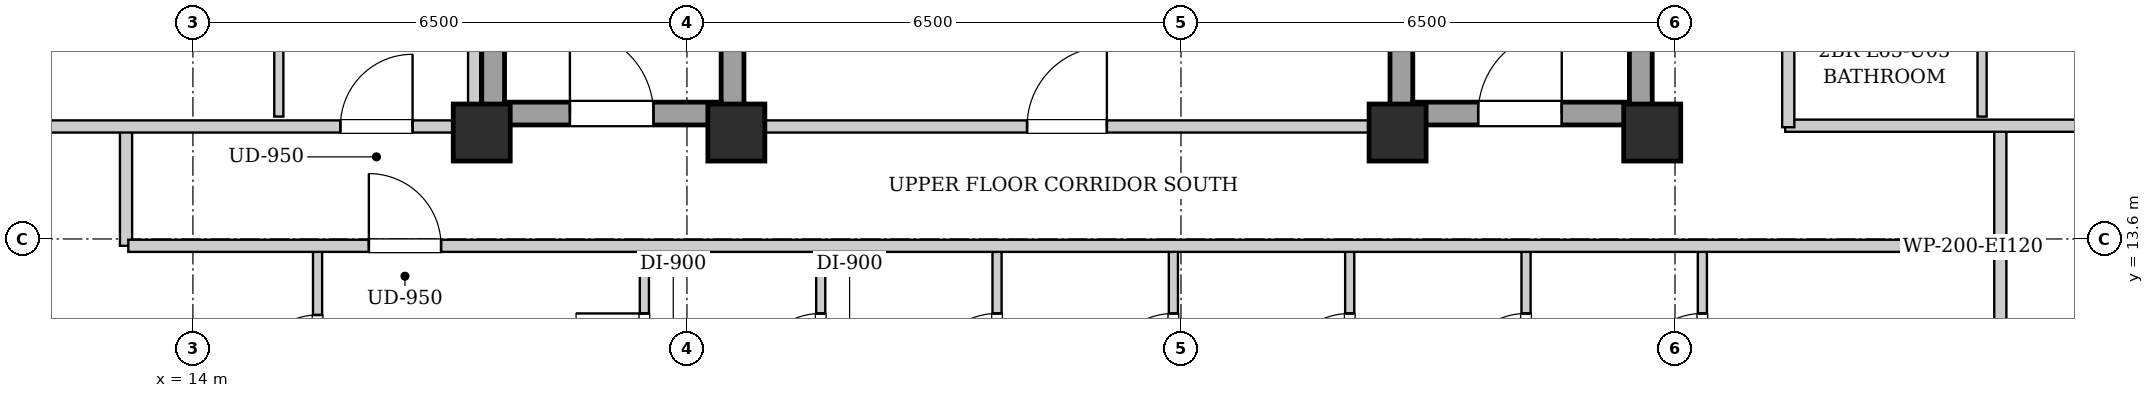
"""IFC4 building model, lengths in metres.
Left out: names, types, materials, properties, quantities, classifications, styles, units other than length and angle.
Written with IfcOpenShell. Run it as: python <this file> out.ifc"""

import sys

from ifc_helpers import new_model, si_unit, direction, frame, frame_2d, origin, origin_2d, place, context, subcontext, project, spatial, rectangle, extrude, element, fill, save


model = new_model("IFC4")
c1 = context("Model", 3, precision=1e-05, world=origin(), true_north=direction((0.0, 1.0)))
c2 = subcontext(c1, "Body", "Model", "MODEL_VIEW")
j1 = project(units=[si_unit("LENGTHUNIT", "METRE"), si_unit("PLANEANGLEUNIT", "RADIAN")], contexts=[c1])
p1 = place(None, origin())
s1 = spatial("IfcSite", under=j1, at=p1, CompositionType="ELEMENT")
p2 = place(p1, origin())
s2 = spatial("IfcBuilding", under=s1, at=p2, CompositionType="ELEMENT")
p3 = place(p2, frame((0.0, 0.0, 224.1)))
s3 = spatial("IfcBuildingStorey", under=s2, at=p3, CompositionType="ELEMENT", Elevation=224.1)
for number, where, z_axis, x_axis in (
    (1, (17.8, 15.0, 0.0), (0.0, 0.0, 1.0), (1.0, 0.0, 0.0)),
    (2, (21.15, 15.0, 0.0), (0.0, 0.0, 1.0), (1.0, 0.0, 0.0)),
    (3, (29.85, 15.0, 0.0), (0.0, 0.0, 1.0), (1.0, 0.0, 0.0)),
    (4, (33.2, 15.0, 0.0), (0.0, 0.0, 1.0), (1.0, 0.0, 0.0)),
):
    element("IfcColumn", number, at=place(p3, frame(where, z_axis=z_axis, x_axis=x_axis)), inside=s3, PredefinedType="COLUMN", context=c2, shape_type="SweptSolid", body=[
        extrude(rectangle(XDim=0.75, YDim=0.75, at=origin_2d()), origin(), (0.0, 0.0, 1.0), 3.4),
    ])
for number, where, z_axis, x_axis in (
    (5, (17.95, 15.1, 0.0), (0.0, 0.0, 1.0), (0.0, 1.0, 0.0)),
    (6, (21.1, 15.1, 0.0), (0.0, 0.0, 1.0), (0.0, 1.0, 0.0)),
):
    element("IfcWall", number, at=place(p3, frame(where, z_axis=z_axis, x_axis=x_axis)), inside=s3, PredefinedType="SHEAR", context=c2, shape_type="SweptSolid", body=[
        extrude(rectangle(XDim=9.0, YDim=0.3, at=frame_2d((4.5, 0.0))), origin(), (0.0, 0.0, 1.0), 3.14),
    ])
p4 = place(p3, frame((18.1, 15.25, 0.0), z_axis=(0.0, 0.0, 1.0), x_axis=(1.0, 0.0, 0.0)))
e7 = element("IfcWall", 7, at=p4, inside=s3, PredefinedType="SHEAR", context=c2, shape_type="SweptSolid", body=[
    extrude(rectangle(XDim=2.85, YDim=0.3, at=frame_2d((1.425, 0.0))), origin(), (0.0, 0.0, 1.0), 3.14),
])
p5 = place(p4, frame((0.86, 0.0, 0.0)))
e8 = element("IfcOpeningElement", 8, at=p5, cuts=e7, PredefinedType="OPENING", context=c2, shape_type="SweptSolid", body=[
    extrude(rectangle(XDim=1.1, YDim=2.05, at=frame_2d((0.55, 1.025))), frame((0.0, 0.16, 0.0), z_axis=(0.0, -1.0, 0.0), x_axis=(1.0, 0.0, 0.0)), (0.0, 0.0, 1.0), 0.32),
])
for number, where, z_axis, x_axis in (
    (9, (29.9, 15.1, 0.0), (0.0, 0.0, 1.0), (0.0, 1.0, 0.0)),
    (10, (33.05, 15.1, 0.0), (0.0, 0.0, 1.0), (0.0, 1.0, 0.0)),
):
    element("IfcWall", number, at=place(p3, frame(where, z_axis=z_axis, x_axis=x_axis)), inside=s3, PredefinedType="SHEAR", context=c2, shape_type="SweptSolid", body=[
        extrude(rectangle(XDim=9.0, YDim=0.3, at=frame_2d((4.5, 0.0))), origin(), (0.0, 0.0, 1.0), 3.14),
    ])
p6 = place(p3, frame((30.05, 15.25, 0.0), z_axis=(0.0, 0.0, 1.0), x_axis=(1.0, 0.0, 0.0)))
e11 = element("IfcWall", 11, at=p6, inside=s3, PredefinedType="SHEAR", context=c2, shape_type="SweptSolid", body=[
    extrude(rectangle(XDim=2.85, YDim=0.3, at=frame_2d((1.425, 0.0))), origin(), (0.0, 0.0, 1.0), 3.14),
])
p7 = place(p6, frame((0.86, 0.0, 0.0)))
e12 = element("IfcOpeningElement", 12, at=p7, cuts=e11, PredefinedType="OPENING", context=c2, shape_type="SweptSolid", body=[
    extrude(rectangle(XDim=1.1, YDim=2.05, at=frame_2d((0.55, 1.025))), frame((0.0, 0.16, 0.0), z_axis=(0.0, -1.0, 0.0), x_axis=(1.0, 0.0, 0.0)), (0.0, 0.0, 1.0), 0.32),
])
p8 = place(p3, frame((21.25, 15.08, 0.0), z_axis=(0.0, 0.0, 1.0), x_axis=(1.0, 0.0, 0.0)))
e13 = element("IfcWall", 13, at=p8, inside=s3, PredefinedType="PARTITIONING", context=c2, shape_type="SweptSolid", body=[
    extrude(rectangle(XDim=8.5, YDim=0.16, at=frame_2d((4.25, 0.0))), origin(), (0.0, 0.0, 1.0), 2.668),
])
p9 = place(p8, frame((3.725, 0.0, 0.0)))
e14 = element("IfcOpeningElement", 14, at=p9, cuts=e13, PredefinedType="OPENING", context=c2, shape_type="SweptSolid", body=[
    extrude(rectangle(XDim=1.05, YDim=2.05, at=frame_2d((0.525, 1.025))), frame((0.0, 0.09, 0.0), z_axis=(0.0, -1.0, 0.0), x_axis=(1.0, 0.0, 0.0)), (0.0, 0.0, 1.0), 0.18),
])
for number, where, z_axis, x_axis in (
    (15, (13.12, 13.51, 0.0), (0.0, 0.0, 1.0), (0.0, 1.0, 0.0)),
    (16, (37.78, 13.51, 0.0), (0.0, 0.0, 1.0), (0.0, 1.0, 0.0)),
):
    element("IfcWall", number, at=place(p3, frame(where, z_axis=z_axis, x_axis=x_axis)), inside=s3, PredefinedType="PARTITIONING", context=c2, shape_type="SweptSolid", body=[
        extrude(rectangle(XDim=1.58, YDim=0.16, at=frame_2d((0.79, 0.0))), origin(), (0.0, 0.0, 1.0), 3.14),
    ])
p10 = place(p3, frame((34.95, 15.09, 0.0), z_axis=(0.0, 0.0, 1.0), x_axis=(1.0, 0.0, 0.0)))
e17 = element("IfcWall", 17, at=p10, inside=s3, PredefinedType="PARTITIONING", context=c2, shape_type="SweptSolid", body=[
    extrude(rectangle(XDim=5.07, YDim=0.16, at=frame_2d((2.535, 0.0))), origin(), (0.0, 0.0, 1.0), 2.668),
])
p11 = place(p3, frame((37.78, 10.81, 0.0), z_axis=(0.0, 0.0, 1.0), x_axis=(0.0, 1.0, 0.0)))
e18 = element("IfcWall", 18, at=p11, inside=s3, PredefinedType="PARTITIONING", context=c2, shape_type="SweptSolid", body=[
    extrude(rectangle(XDim=2.66, YDim=0.16, at=frame_2d((1.33, 0.0))), origin(), (0.0, 0.0, 1.0), 3.14),
])
p12 = place(p3, frame((15.64, 10.87, 0.0), z_axis=(0.0, 0.0, 1.0), x_axis=(0.0, 1.0, 0.0)))
e19 = element("IfcWall", 19, at=p12, inside=s3, PredefinedType="PARTITIONING", context=c2, shape_type="SweptSolid", body=[
    extrude(rectangle(XDim=2.6, YDim=0.12, at=frame_2d((1.3, 0.0))), origin(), (0.0, 0.0, 1.0), 3.14),
])
p13 = place(p12, frame((0.87, 0.0, 0.0)))
e20 = element("IfcOpeningElement", 20, at=p13, cuts=e19, PredefinedType="OPENING", context=c2, shape_type="SweptSolid", body=[
    extrude(rectangle(XDim=0.86, YDim=2.05, at=frame_2d((0.43, 1.025))), frame((0.0, 0.07, 0.0), z_axis=(0.0, -1.0, 0.0), x_axis=(1.0, 0.0, 0.0)), (0.0, 0.0, 1.0), 0.14),
])
p14 = place(p3, frame((19.94, 10.87, 0.0), z_axis=(0.0, 0.0, 1.0), x_axis=(0.0, 1.0, 0.0)))
e21 = element("IfcWall", 21, at=p14, inside=s3, PredefinedType="PARTITIONING", context=c2, shape_type="SweptSolid", body=[
    extrude(rectangle(XDim=2.6, YDim=0.12, at=frame_2d((1.3, 0.0))), origin(), (0.0, 0.0, 1.0), 3.14),
])
p15 = place(p14, frame((0.85, 0.0, 0.0)))
e22 = element("IfcOpeningElement", 22, at=p15, cuts=e21, PredefinedType="OPENING", context=c2, shape_type="SweptSolid", body=[
    extrude(rectangle(XDim=0.9, YDim=2.05, at=frame_2d((0.45, 1.025))), frame((0.0, 0.07, 0.0), z_axis=(0.0, -1.0, 0.0), x_axis=(1.0, 0.0, 0.0)), (0.0, 0.0, 1.0), 0.14),
])
p16 = place(p3, frame((22.26, 10.87, 0.0), z_axis=(0.0, 0.0, 1.0), x_axis=(0.0, 1.0, 0.0)))
e23 = element("IfcWall", 23, at=p16, inside=s3, PredefinedType="PARTITIONING", context=c2, shape_type="SweptSolid", body=[
    extrude(rectangle(XDim=2.6, YDim=0.12, at=frame_2d((1.3, 0.0))), origin(), (0.0, 0.0, 1.0), 3.14),
])
p17 = place(p16, frame((0.85, 0.0, 0.0)))
e24 = element("IfcOpeningElement", 24, at=p17, cuts=e23, PredefinedType="OPENING", context=c2, shape_type="SweptSolid", body=[
    extrude(rectangle(XDim=0.9, YDim=2.05, at=frame_2d((0.45, 1.025))), frame((0.0, 0.07, 0.0), z_axis=(0.0, -1.0, 0.0), x_axis=(1.0, 0.0, 0.0)), (0.0, 0.0, 1.0), 0.14),
])
p18 = place(p3, frame((24.58, 10.87, 0.0), z_axis=(0.0, 0.0, 1.0), x_axis=(0.0, 1.0, 0.0)))
e25 = element("IfcWall", 25, at=p18, inside=s3, PredefinedType="PARTITIONING", context=c2, shape_type="SweptSolid", body=[
    extrude(rectangle(XDim=2.6, YDim=0.12, at=frame_2d((1.3, 0.0))), origin(), (0.0, 0.0, 1.0), 3.14),
])
p19 = place(p18, frame((0.85, 0.0, 0.0)))
e26 = element("IfcOpeningElement", 26, at=p19, cuts=e25, PredefinedType="OPENING", context=c2, shape_type="SweptSolid", body=[
    extrude(rectangle(XDim=0.9, YDim=2.05, at=frame_2d((0.45, 1.025))), frame((0.0, 0.07, 0.0), z_axis=(0.0, -1.0, 0.0), x_axis=(1.0, 0.0, 0.0)), (0.0, 0.0, 1.0), 0.14),
])
p20 = place(p3, frame((26.9, 10.87, 0.0), z_axis=(0.0, 0.0, 1.0), x_axis=(0.0, 1.0, 0.0)))
e27 = element("IfcWall", 27, at=p20, inside=s3, PredefinedType="PARTITIONING", context=c2, shape_type="SweptSolid", body=[
    extrude(rectangle(XDim=2.6, YDim=0.12, at=frame_2d((1.3, 0.0))), origin(), (0.0, 0.0, 1.0), 3.14),
])
p21 = place(p20, frame((0.85, 0.0, 0.0)))
e28 = element("IfcOpeningElement", 28, at=p21, cuts=e27, PredefinedType="OPENING", context=c2, shape_type="SweptSolid", body=[
    extrude(rectangle(XDim=0.9, YDim=2.05, at=frame_2d((0.45, 1.025))), frame((0.0, 0.07, 0.0), z_axis=(0.0, -1.0, 0.0), x_axis=(1.0, 0.0, 0.0)), (0.0, 0.0, 1.0), 0.14),
])
p22 = place(p3, frame((29.22, 10.87, 0.0), z_axis=(0.0, 0.0, 1.0), x_axis=(0.0, 1.0, 0.0)))
e29 = element("IfcWall", 29, at=p22, inside=s3, PredefinedType="PARTITIONING", context=c2, shape_type="SweptSolid", body=[
    extrude(rectangle(XDim=2.6, YDim=0.12, at=frame_2d((1.3, 0.0))), origin(), (0.0, 0.0, 1.0), 3.14),
])
p23 = place(p22, frame((0.85, 0.0, 0.0)))
e30 = element("IfcOpeningElement", 30, at=p23, cuts=e29, PredefinedType="OPENING", context=c2, shape_type="SweptSolid", body=[
    extrude(rectangle(XDim=0.9, YDim=2.05, at=frame_2d((0.45, 1.025))), frame((0.0, 0.07, 0.0), z_axis=(0.0, -1.0, 0.0), x_axis=(1.0, 0.0, 0.0)), (0.0, 0.0, 1.0), 0.14),
])
p24 = place(p3, frame((31.54, 10.87, 0.0), z_axis=(0.0, 0.0, 1.0), x_axis=(0.0, 1.0, 0.0)))
e31 = element("IfcWall", 31, at=p24, inside=s3, PredefinedType="PARTITIONING", context=c2, shape_type="SweptSolid", body=[
    extrude(rectangle(XDim=2.6, YDim=0.12, at=frame_2d((1.3, 0.0))), origin(), (0.0, 0.0, 1.0), 3.14),
])
p25 = place(p24, frame((0.85, 0.0, 0.0)))
e32 = element("IfcOpeningElement", 32, at=p25, cuts=e31, PredefinedType="OPENING", context=c2, shape_type="SweptSolid", body=[
    extrude(rectangle(XDim=0.9, YDim=2.05, at=frame_2d((0.45, 1.025))), frame((0.0, 0.07, 0.0), z_axis=(0.0, -1.0, 0.0), x_axis=(1.0, 0.0, 0.0)), (0.0, 0.0, 1.0), 0.14),
])
p26 = place(p3, frame((33.86, 10.87, 0.0), z_axis=(0.0, 0.0, 1.0), x_axis=(0.0, 1.0, 0.0)))
e33 = element("IfcWall", 33, at=p26, inside=s3, PredefinedType="PARTITIONING", context=c2, shape_type="SweptSolid", body=[
    extrude(rectangle(XDim=2.6, YDim=0.12, at=frame_2d((1.3, 0.0))), origin(), (0.0, 0.0, 1.0), 3.14),
])
p27 = place(p26, frame((0.85, 0.0, 0.0)))
e34 = element("IfcOpeningElement", 34, at=p27, cuts=e33, PredefinedType="OPENING", context=c2, shape_type="SweptSolid", body=[
    extrude(rectangle(XDim=0.9, YDim=2.05, at=frame_2d((0.45, 1.025))), frame((0.0, 0.07, 0.0), z_axis=(0.0, -1.0, 0.0), x_axis=(1.0, 0.0, 0.0)), (0.0, 0.0, 1.0), 0.14),
])
p28 = place(p3, frame((10.88, 15.08, 0.0), z_axis=(0.0, 0.0, 1.0), x_axis=(1.0, 0.0, 0.0)))
e35 = element("IfcWall", 35, at=p28, inside=s3, PredefinedType="PARTITIONING", context=c2, shape_type="SweptSolid", body=[
    extrude(rectangle(XDim=6.88, YDim=0.16, at=frame_2d((3.44, 0.0))), origin(), (0.0, 0.0, 1.0), 2.668),
])
p29 = place(p28, frame((5.06, 0.0, 0.0)))
e36 = element("IfcOpeningElement", 36, at=p29, cuts=e35, PredefinedType="OPENING", context=c2, shape_type="SweptSolid", body=[
    extrude(rectangle(XDim=0.95, YDim=2.1, at=frame_2d((0.475, 1.05))), frame((0.0, 0.09, 0.0), z_axis=(0.0, -1.0, 0.0), x_axis=(1.0, 0.0, 0.0)), (0.0, 0.0, 1.0), 0.18),
])
p30 = place(p3, frame((15.13, 15.21, 0.0), z_axis=(0.0, 0.0, 1.0), x_axis=(0.0, 1.0, 0.0)))
e37 = element("IfcWall", 37, at=p30, inside=s3, PredefinedType="PARTITIONING", context=c2, shape_type="SweptSolid", body=[
    extrude(rectangle(XDim=4.308, YDim=0.12, at=frame_2d((2.154, 0.0))), origin(), (0.0, 0.0, 1.0), 3.14),
])
p31 = place(p30, frame((1.704, 0.0, 0.0)))
e38 = element("IfcOpeningElement", 38, at=p31, cuts=e37, PredefinedType="OPENING", context=c2, shape_type="SweptSolid", body=[
    extrude(rectangle(XDim=0.9, YDim=2.05, at=frame_2d((0.45, 1.025))), frame((0.0, 0.07, 0.0), z_axis=(0.0, -1.0, 0.0), x_axis=(1.0, 0.0, 0.0)), (0.0, 0.0, 1.0), 0.14),
])
p32 = place(p3, frame((37.54, 15.21, 0.0), z_axis=(0.0, 0.0, 1.0), x_axis=(0.0, 1.0, 0.0)))
e39 = element("IfcWall", 39, at=p32, inside=s3, PredefinedType="PARTITIONING", context=c2, shape_type="SweptSolid", body=[
    extrude(rectangle(XDim=2.3, YDim=0.12, at=frame_2d((1.15, 0.0))), origin(), (0.0, 0.0, 1.0), 3.14),
])
p33 = place(p3, frame((13.15, 13.51, 0.0), z_axis=(0.0, 0.0, 1.0), x_axis=(1.0, 0.0, 0.0)))
e40 = element("IfcWall", 40, at=p33, inside=s3, PredefinedType="PARTITIONING", context=c2, shape_type="SweptSolid", body=[
    extrude(rectangle(XDim=24.6, YDim=0.16, at=frame_2d((12.3, 0.0))), origin(), (0.0, 0.0, 1.0), 3.14),
])
p34 = place(p33, frame((3.165, 0.0, 0.0)))
e41 = element("IfcOpeningElement", 41, at=p34, cuts=e40, PredefinedType="OPENING", context=c2, shape_type="SweptSolid", body=[
    extrude(rectangle(XDim=0.95, YDim=2.1, at=frame_2d((0.475, 1.05))), frame((0.0, 0.09, 0.0), z_axis=(0.0, -1.0, 0.0), x_axis=(1.0, 0.0, 0.0)), (0.0, 0.0, 1.0), 0.18),
])
p35 = place(p3, frame((17.7, 15.02, 0.0), z_axis=(0.0, 0.0, 1.0), x_axis=(0.0, 1.0, 0.0)))
e42 = element("IfcWall", 42, at=p35, inside=s3, PredefinedType="PARTITIONING", context=c2, shape_type="SweptSolid", body=[
    extrude(rectangle(XDim=13.98, YDim=0.16, at=frame_2d((6.99, 0.0))), origin(), (0.0, 0.0, 1.0), 3.14),
])
p36 = place(p3, frame((34.99, 15.07, 0.0), z_axis=(0.0, 0.0, 1.0), x_axis=(0.0, 1.0, 0.0)))
e43 = element("IfcWall", 43, at=p36, inside=s3, PredefinedType="PARTITIONING", context=c2, shape_type="SweptSolid", body=[
    extrude(rectangle(XDim=13.93, YDim=0.16, at=frame_2d((6.965, 0.0))), origin(), (0.0, 0.0, 1.0), 3.14),
])
p37 = place(p36, frame((4.385, 0.0, 0.0)))
e44 = element("IfcOpeningElement", 44, at=p37, cuts=e43, PredefinedType="OPENING", context=c2, shape_type="SweptSolid", body=[
    extrude(rectangle(XDim=0.95, YDim=2.1, at=frame_2d((0.475, 1.05))), frame((0.0, 0.09, 0.0), z_axis=(0.0, -1.0, 0.0), x_axis=(1.0, 0.0, 0.0)), (0.0, 0.0, 1.0), 0.18),
])
p38 = place(p5, origin())
e45 = element("IfcDoor", 45, at=p38, inside=s3, OperationType="SINGLE_SWING_LEFT", PredefinedType="DOOR", context=c2, shape_type="SweptSolid", body=[
    extrude(rectangle(XDim=1.1, YDim=2.05, at=frame_2d((0.55, 1.025))), frame((0.0, 0.025, 0.0), z_axis=(0.0, -1.0, 0.0), x_axis=(1.0, 0.0, 0.0)), (0.0, 0.0, 1.0), 0.05),
])
fill(e8, e45)
p39 = place(p7, origin())
e46 = element("IfcDoor", 46, at=p39, inside=s3, OperationType="SINGLE_SWING_RIGHT", PredefinedType="DOOR", context=c2, shape_type="SweptSolid", body=[
    extrude(rectangle(XDim=1.1, YDim=2.05, at=frame_2d((0.55, 1.025))), frame((0.0, 0.025, 0.0), z_axis=(0.0, -1.0, 0.0), x_axis=(1.0, 0.0, 0.0)), (0.0, 0.0, 1.0), 0.05),
])
fill(e12, e46)
p40 = place(p9, origin())
e47 = element("IfcDoor", 47, at=p40, inside=s3, OperationType="SINGLE_SWING_RIGHT", PredefinedType="DOOR", context=c2, shape_type="SweptSolid", body=[
    extrude(rectangle(XDim=1.05, YDim=2.05, at=frame_2d((0.525, 1.025))), frame((0.0, 0.025, 0.0), z_axis=(0.0, -1.0, 0.0), x_axis=(1.0, 0.0, 0.0)), (0.0, 0.0, 1.0), 0.05),
])
fill(e14, e47)
p41 = place(p13, origin())
e48 = element("IfcDoor", 48, at=p41, inside=s3, OperationType="SINGLE_SWING_LEFT", PredefinedType="DOOR", context=c2, shape_type="SweptSolid", body=[
    extrude(rectangle(XDim=0.86, YDim=2.05, at=frame_2d((0.43, 1.025))), frame((0.0, 0.025, 0.0), z_axis=(0.0, -1.0, 0.0), x_axis=(1.0, 0.0, 0.0)), (0.0, 0.0, 1.0), 0.05),
])
fill(e20, e48)
p42 = place(p15, origin())
e49 = element("IfcDoor", 49, at=p42, inside=s3, OperationType="SINGLE_SWING_RIGHT", PredefinedType="DOOR", context=c2, shape_type="SweptSolid", body=[
    extrude(rectangle(XDim=0.9, YDim=2.05, at=frame_2d((0.45, 1.025))), frame((0.0, 0.025, 0.0), z_axis=(0.0, -1.0, 0.0), x_axis=(1.0, 0.0, 0.0)), (0.0, 0.0, 1.0), 0.05),
])
fill(e22, e49)
p43 = place(p17, origin())
e50 = element("IfcDoor", 50, at=p43, inside=s3, OperationType="SINGLE_SWING_LEFT", PredefinedType="DOOR", context=c2, shape_type="SweptSolid", body=[
    extrude(rectangle(XDim=0.9, YDim=2.05, at=frame_2d((0.45, 1.025))), frame((0.0, 0.025, 0.0), z_axis=(0.0, -1.0, 0.0), x_axis=(1.0, 0.0, 0.0)), (0.0, 0.0, 1.0), 0.05),
])
fill(e24, e50)
p44 = place(p19, origin())
e51 = element("IfcDoor", 51, at=p44, inside=s3, OperationType="SINGLE_SWING_LEFT", PredefinedType="DOOR", context=c2, shape_type="SweptSolid", body=[
    extrude(rectangle(XDim=0.9, YDim=2.05, at=frame_2d((0.45, 1.025))), frame((0.0, 0.025, 0.0), z_axis=(0.0, -1.0, 0.0), x_axis=(1.0, 0.0, 0.0)), (0.0, 0.0, 1.0), 0.05),
])
fill(e26, e51)
p45 = place(p21, origin())
e52 = element("IfcDoor", 52, at=p45, inside=s3, OperationType="SINGLE_SWING_LEFT", PredefinedType="DOOR", context=c2, shape_type="SweptSolid", body=[
    extrude(rectangle(XDim=0.9, YDim=2.05, at=frame_2d((0.45, 1.025))), frame((0.0, 0.025, 0.0), z_axis=(0.0, -1.0, 0.0), x_axis=(1.0, 0.0, 0.0)), (0.0, 0.0, 1.0), 0.05),
])
fill(e28, e52)
p46 = place(p23, origin())
e53 = element("IfcDoor", 53, at=p46, inside=s3, OperationType="SINGLE_SWING_LEFT", PredefinedType="DOOR", context=c2, shape_type="SweptSolid", body=[
    extrude(rectangle(XDim=0.9, YDim=2.05, at=frame_2d((0.45, 1.025))), frame((0.0, 0.025, 0.0), z_axis=(0.0, -1.0, 0.0), x_axis=(1.0, 0.0, 0.0)), (0.0, 0.0, 1.0), 0.05),
])
fill(e30, e53)
p47 = place(p25, origin())
e54 = element("IfcDoor", 54, at=p47, inside=s3, OperationType="SINGLE_SWING_LEFT", PredefinedType="DOOR", context=c2, shape_type="SweptSolid", body=[
    extrude(rectangle(XDim=0.9, YDim=2.05, at=frame_2d((0.45, 1.025))), frame((0.0, 0.025, 0.0), z_axis=(0.0, -1.0, 0.0), x_axis=(1.0, 0.0, 0.0)), (0.0, 0.0, 1.0), 0.05),
])
fill(e32, e54)
p48 = place(p27, origin())
e55 = element("IfcDoor", 55, at=p48, inside=s3, OperationType="SINGLE_SWING_LEFT", PredefinedType="DOOR", context=c2, shape_type="SweptSolid", body=[
    extrude(rectangle(XDim=0.9, YDim=2.05, at=frame_2d((0.45, 1.025))), frame((0.0, 0.025, 0.0), z_axis=(0.0, -1.0, 0.0), x_axis=(1.0, 0.0, 0.0)), (0.0, 0.0, 1.0), 0.05),
])
fill(e34, e55)
p49 = place(p29, origin())
e56 = element("IfcDoor", 56, at=p49, inside=s3, OperationType="SINGLE_SWING_RIGHT", PredefinedType="DOOR", context=c2, shape_type="SweptSolid", body=[
    extrude(rectangle(XDim=0.95, YDim=2.1, at=frame_2d((0.475, 1.05))), frame((0.0, 0.025, 0.0), z_axis=(0.0, -1.0, 0.0), x_axis=(1.0, 0.0, 0.0)), (0.0, 0.0, 1.0), 0.05),
])
fill(e36, e56)
p50 = place(p34, origin())
e57 = element("IfcDoor", 57, at=p50, inside=s3, OperationType="SINGLE_SWING_LEFT", PredefinedType="DOOR", context=c2, shape_type="SweptSolid", body=[
    extrude(rectangle(XDim=0.95, YDim=2.1, at=frame_2d((0.475, 1.05))), frame((0.0, 0.025, 0.0), z_axis=(0.0, -1.0, 0.0), x_axis=(1.0, 0.0, 0.0)), (0.0, 0.0, 1.0), 0.05),
])
fill(e41, e57)
save(model, sys.argv[1])
